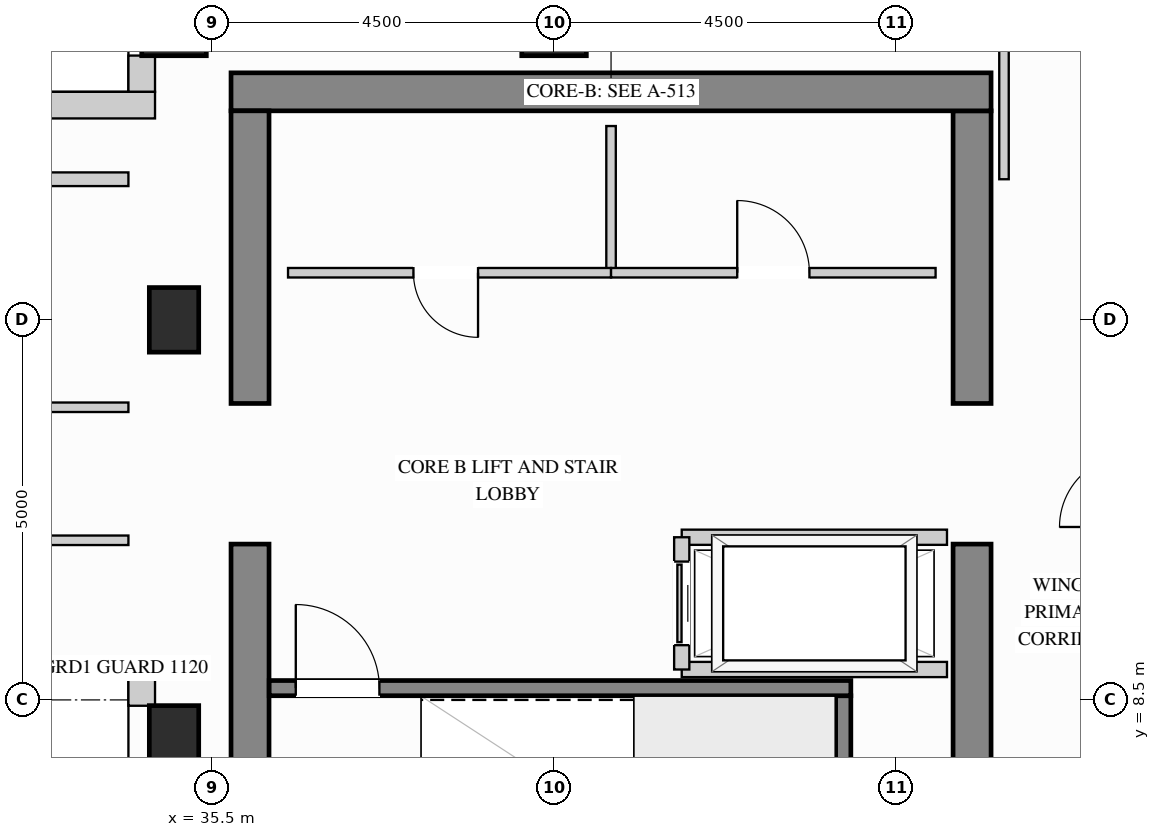
"""IFC4 building model, lengths in metres.
Left out: names, types, materials, properties, quantities, classifications, styles, units other than length and angle.
Written with IfcOpenShell. Run it as: python <this file> out.ifc"""

import sys

from ifc_helpers import new_model, si_unit, direction, frame, frame_2d, origin, origin_2d, place, context, subcontext, project, spatial, rectangle, extrude, source, transform, mapped, element, fill, save


model = new_model("IFC4")
c1 = context("Model", 3, precision=1e-05, world=origin(), true_north=direction((0.0, 1.0)))
c2 = subcontext(c1, "Body", "Model", "MODEL_VIEW")
j1 = project(units=[si_unit("LENGTHUNIT", "METRE"), si_unit("PLANEANGLEUNIT", "RADIAN")], contexts=[c1])
p1 = place(None, origin())
s1 = spatial("IfcSite", under=j1, at=p1, CompositionType="ELEMENT")
p2 = place(p1, origin())
s2 = spatial("IfcBuilding", under=s1, at=p2, CompositionType="ELEMENT")
p3 = place(p2, frame((0.0, 0.0, 248.4)))
s3 = spatial("IfcBuildingStorey", under=s2, at=p3, CompositionType="ELEMENT", Elevation=248.4)
m1 = source(origin(), c2, "Body", "SweptSolid", [
    extrude(rectangle(XDim=0.65, YDim=0.85, at=origin_2d()), origin(), (0.0, 0.0, 1.0), 3.4),
])
for number, where, z_axis, x_axis in (
    (1, (35.0, 13.5, 0.0), (0.0, 0.0, 1.0), (1.0, 0.0, 0.0)),
    (2, (35.0, 8.0, 0.0), (0.0, 0.0, 1.0), (1.0, 0.0, 0.0)),
):
    element("IfcColumn", number, at=place(p3, frame(where, z_axis=z_axis, x_axis=x_axis)), inside=s3, PredefinedType="COLUMN", context=c2, shape_type="MappedRepresentation", body=[
        mapped(m1, transform((0.0, 0.0, 0.0), x_axis=(1.0, 0.0, 0.0), y_axis=(0.0, 1.0, 0.0), z_axis=(0.0, 0.0, 1.0))),
    ])
m2 = source(origin(), c2, "Body", "SweptSolid", [
    extrude(rectangle(XDim=0.85, YDim=0.85, at=origin_2d()), origin(), (0.0, 0.0, 1.0), 3.4),
])
for number, where, z_axis, x_axis in (
    (3, (35.0, 17.4, 0.0), (0.0, 0.0, 1.0), (1.0, 0.0, 0.0)),
    (4, (40.0, 17.4, 0.0), (0.0, 0.0, 1.0), (1.0, 0.0, 0.0)),
):
    element("IfcColumn", number, at=place(p3, frame(where, z_axis=z_axis, x_axis=x_axis)), inside=s3, PredefinedType="COLUMN", context=c2, shape_type="MappedRepresentation", body=[
        mapped(m2, transform((0.0, 0.0, 0.0), x_axis=(1.0, 0.0, 0.0), y_axis=(0.0, 1.0, 0.0), z_axis=(0.0, 0.0, 1.0))),
    ])
m3 = source(origin(), c2, "Body", "SweptSolid", [
    extrude(rectangle(XDim=5.8, YDim=0.5, at=frame_2d((2.9, 0.0))), origin(), (0.0, 0.0, 1.0), 3.4),
])
p4 = place(p3, frame((45.5, 4.75, 0.0), z_axis=(0.0, 0.0, 1.0), x_axis=(0.0, 1.0, 0.0)))
e5 = element("IfcWall", 5, at=p4, inside=s3, PredefinedType="SHEAR", context=c2, shape_type="MappedRepresentation", body=[
    mapped(m3, transform((0.0, 0.0, 0.0), x_axis=(1.0, 0.0, 0.0), y_axis=(0.0, 1.0, 0.0), z_axis=(0.0, 0.0, 1.0))),
])
m4 = source(origin(), c2, "Body", "SweptSolid", [
    extrude(rectangle(XDim=3.85, YDim=0.5, at=frame_2d((1.925, 0.0))), origin(), (0.0, 0.0, 1.0), 3.4),
])
p5 = place(p3, frame((45.5, 12.4, 0.0), z_axis=(0.0, 0.0, 1.0), x_axis=(0.0, 1.0, 0.0)))
e6 = element("IfcWall", 6, at=p5, inside=s3, PredefinedType="SHEAR", context=c2, shape_type="MappedRepresentation", body=[
    mapped(m4, transform((0.0, 0.0, 0.0), x_axis=(1.0, 0.0, 0.0), y_axis=(0.0, 1.0, 0.0), z_axis=(0.0, 0.0, 1.0))),
])
m5 = source(origin(), c2, "Body", "SweptSolid", [
    extrude(rectangle(XDim=10.0, YDim=0.5, at=frame_2d((5.0, 0.0))), origin(), (0.0, 0.0, 1.0), 3.4),
])
p6 = place(p3, frame((35.75, 16.5, 0.0), z_axis=(0.0, 0.0, 1.0), x_axis=(1.0, 0.0, 0.0)))
e7 = element("IfcWall", 7, at=p6, inside=s3, PredefinedType="SHEAR", context=c2, shape_type="MappedRepresentation", body=[
    mapped(m5, transform((0.0, 0.0, 0.0), x_axis=(1.0, 0.0, 0.0), y_axis=(0.0, 1.0, 0.0), z_axis=(0.0, 0.0, 1.0))),
])
p7 = place(p3, frame((36.0, 4.75, 0.0), z_axis=(0.0, 0.0, 1.0), x_axis=(0.0, 1.0, 0.0)))
e8 = element("IfcWall", 8, at=p7, inside=s3, PredefinedType="SHEAR", context=c2, shape_type="MappedRepresentation", body=[
    mapped(m3, transform((0.0, 0.0, 0.0), x_axis=(1.0, 0.0, 0.0), y_axis=(0.0, 1.0, 0.0), z_axis=(0.0, 0.0, 1.0))),
])
p8 = place(p3, frame((36.0, 12.4, 0.0), z_axis=(0.0, 0.0, 1.0), x_axis=(0.0, 1.0, 0.0)))
e9 = element("IfcWall", 9, at=p8, inside=s3, PredefinedType="SHEAR", context=c2, shape_type="MappedRepresentation", body=[
    mapped(m4, transform((0.0, 0.0, 0.0), x_axis=(1.0, 0.0, 0.0), y_axis=(0.0, 1.0, 0.0), z_axis=(0.0, 0.0, 1.0))),
])
m6 = source(origin(), c2, "Body", "SweptSolid", [
    extrude(rectangle(XDim=0.379, YDim=0.35, at=frame_2d((0.189, 0.0))), origin(), (0.0, 0.0, 1.0), 3.385),
])
p9 = place(p3, frame((34.575, 8.802, 0.0), z_axis=(0.0, 0.0, 1.0), x_axis=(0.0, -1.0, 0.0)))
e10 = element("IfcWall", 10, at=p9, inside=s3, PredefinedType="SOLIDWALL", context=c2, shape_type="MappedRepresentation", body=[
    mapped(m6, transform((0.0, 0.0, 0.0), x_axis=(1.0, 0.0, 0.0), y_axis=(0.0, 1.0, 0.0), z_axis=(0.0, 0.0, 1.0))),
])
m7 = source(origin(), c2, "Body", "SweptSolid", [
    extrude(rectangle(XDim=0.479, YDim=0.35, at=frame_2d((0.24, 0.0))), origin(), (0.0, 0.0, 1.0), 3.385),
])
p10 = place(p3, frame((34.575, 16.977, 0.0), z_axis=(0.0, 0.0, 1.0), x_axis=(0.0, -1.0, 0.0)))
e11 = element("IfcWall", 11, at=p10, inside=s3, PredefinedType="SOLIDWALL", context=c2, shape_type="MappedRepresentation", body=[
    mapped(m7, transform((0.0, 0.0, 0.0), x_axis=(1.0, 0.0, 0.0), y_axis=(0.0, 1.0, 0.0), z_axis=(0.0, 0.0, 1.0))),
])
m8 = source(origin(), c2, "Body", "SweptSolid", [
    extrude(rectangle(XDim=3.927, YDim=0.35, at=frame_2d((1.963, 0.0))), origin(), (0.0, 0.0, 1.0), 3.385),
])
p11 = place(p3, frame((34.75, 16.325, 0.0), z_axis=(0.0, 0.0, 1.0), x_axis=(-1.0, 0.0, 0.0)))
e12 = element("IfcWall", 12, at=p11, inside=s3, PredefinedType="SOLIDWALL", context=c2, shape_type="MappedRepresentation", body=[
    mapped(m8, transform((0.0, 0.0, 0.0), x_axis=(1.0, 0.0, 0.0), y_axis=(0.0, 1.0, 0.0), z_axis=(0.0, 0.0, 1.0))),
])
m9 = source(origin(), c2, "Body", "SweptSolid", [
    extrude(rectangle(XDim=15.25, YDim=0.18, at=frame_2d((7.625, 0.0))), origin(), (0.0, 0.0, 1.0), 3.385),
])
p12 = place(p3, frame((19.15, 15.35, 0.0), z_axis=(0.0, 0.0, 1.0), x_axis=(1.0, 0.0, 0.0)))
e13 = element("IfcWall", 13, at=p12, inside=s3, PredefinedType="PARTITIONING", context=c2, shape_type="MappedRepresentation", body=[
    mapped(m9, transform((0.0, 0.0, 0.0), x_axis=(1.0, 0.0, 0.0), y_axis=(0.0, 1.0, 0.0), z_axis=(0.0, 0.0, 1.0))),
])
m10 = source(origin(), c2, "Body", "SweptSolid", [
    extrude(rectangle(XDim=1.93, YDim=0.125, at=frame_2d((0.965, 0.0))), origin(), (0.0, 0.0, 1.0), 3.385),
])
p13 = place(p3, frame((40.75, 14.12, 0.0), z_axis=(0.0, 0.0, 1.0), x_axis=(0.0, 1.0, 0.0)))
e14 = element("IfcWall", 14, at=p13, inside=s3, PredefinedType="PARTITIONING", context=c2, shape_type="MappedRepresentation", body=[
    mapped(m10, transform((0.0, 0.0, 0.0), x_axis=(1.0, 0.0, 0.0), y_axis=(0.0, 1.0, 0.0), z_axis=(0.0, 0.0, 1.0))),
])
p14 = place(p3, frame((36.5, 14.12, 0.0), z_axis=(0.0, 0.0, 1.0), x_axis=(1.0, 0.0, 0.0)))
e15 = element("IfcWall", 15, at=p14, inside=s3, PredefinedType="PARTITIONING", context=c2, shape_type="SweptSolid", body=[
    extrude(rectangle(XDim=4.25, YDim=0.125, at=frame_2d((2.125, 0.0))), origin(), (0.0, 0.0, 1.0), 3.385),
])
p15 = place(p14, frame((1.65, 0.0, 0.0)))
e16 = element("IfcOpeningElement", 16, at=p15, cuts=e15, PredefinedType="OPENING", context=c2, shape_type="SweptSolid", body=[
    extrude(rectangle(XDim=0.85, YDim=2.1, at=frame_2d((0.425, 1.05))), frame((0.0, 0.073, 0.0), z_axis=(0.0, -1.0, 0.0), x_axis=(1.0, 0.0, 0.0)), (0.0, 0.0, 1.0), 0.145),
])
p16 = place(p3, frame((40.75, 14.12, 0.0), z_axis=(0.0, 0.0, 1.0), x_axis=(1.0, 0.0, 0.0)))
e17 = element("IfcWall", 17, at=p16, inside=s3, PredefinedType="PARTITIONING", context=c2, shape_type="SweptSolid", body=[
    extrude(rectangle(XDim=4.27, YDim=0.125, at=frame_2d((2.135, 0.0))), origin(), (0.0, 0.0, 1.0), 3.385),
])
p17 = place(p16, frame((1.66, 0.0, 0.0)))
e18 = element("IfcOpeningElement", 18, at=p17, cuts=e17, PredefinedType="OPENING", context=c2, shape_type="SweptSolid", body=[
    extrude(rectangle(XDim=0.95, YDim=2.15, at=frame_2d((0.475, 1.075))), frame((0.0, 0.073, 0.0), z_axis=(0.0, -1.0, 0.0), x_axis=(1.0, 0.0, 0.0)), (0.0, 0.0, 1.0), 0.145),
])
m11 = source(origin(), c2, "Body", "SweptSolid", [
    extrude(rectangle(XDim=2.298, YDim=0.125, at=frame_2d((1.149, 0.0))), origin(), (0.0, 0.0, 1.0), 3.385),
])
p18 = place(p3, frame((45.92, 15.35, 0.0), z_axis=(0.0, 0.0, 1.0), x_axis=(0.0, 1.0, 0.0)))
e19 = element("IfcWall", 19, at=p18, inside=s3, PredefinedType="PARTITIONING", context=c2, shape_type="MappedRepresentation", body=[
    mapped(m11, transform((0.0, 0.0, 0.0), x_axis=(1.0, 0.0, 0.0), y_axis=(0.0, 1.0, 0.0), z_axis=(0.0, 0.0, 1.0))),
])
p19 = place(p3, frame((29.85, 12.35, 0.0), z_axis=(0.0, 0.0, 1.0), x_axis=(1.0, 0.0, 0.0)))
e20 = element("IfcWall", 20, at=p19, inside=s3, PredefinedType="PARTITIONING", context=c2, shape_type="SweptSolid", body=[
    extrude(rectangle(XDim=4.55, YDim=0.125, at=frame_2d((2.275, 0.0))), origin(), (0.0, 0.0, 1.0), 3.385),
])
p20 = place(p19, frame((1.8, 0.0, 0.0)))
e21 = element("IfcOpeningElement", 21, at=p20, cuts=e20, PredefinedType="OPENING", context=c2, shape_type="SweptSolid", body=[
    extrude(rectangle(XDim=0.95, YDim=2.15, at=frame_2d((0.475, 1.075))), frame((0.0, 0.073, 0.0), z_axis=(0.0, -1.0, 0.0), x_axis=(1.0, 0.0, 0.0)), (0.0, 0.0, 1.0), 0.145),
])
p21 = place(p3, frame((26.95, 10.6, 0.0), z_axis=(0.0, 0.0, 1.0), x_axis=(1.0, 0.0, 0.0)))
e22 = element("IfcWall", 22, at=p21, inside=s3, PredefinedType="PARTITIONING", context=c2, shape_type="SweptSolid", body=[
    extrude(rectangle(XDim=7.45, YDim=0.125, at=frame_2d((3.725, 0.0))), origin(), (0.0, 0.0, 1.0), 3.385),
])
p22 = place(p21, frame((4.478, 0.0, 0.0)))
e23 = element("IfcOpeningElement", 23, at=p22, cuts=e22, PredefinedType="OPENING", context=c2, shape_type="SweptSolid", body=[
    extrude(rectangle(XDim=0.95, YDim=2.15, at=frame_2d((0.475, 1.075))), frame((0.0, 0.073, 0.0), z_axis=(0.0, -1.0, 0.0), x_axis=(1.0, 0.0, 0.0)), (0.0, 0.0, 1.0), 0.145),
])
m12 = source(origin(), c2, "Body", "SweptSolid", [
    extrude(rectangle(XDim=3.49, YDim=0.2, at=frame_2d((1.745, 0.0))), origin(), (0.0, 0.0, 1.0), 3.385),
])
for number, where, z_axis, x_axis in (
    (24, (41.68, 10.64, 0.0), (0.0, 0.0, 1.0), (1.0, 0.0, 0.0)),
    (25, (41.68, 8.9, 0.0), (0.0, 0.0, 1.0), (1.0, 0.0, 0.0)),
):
    element("IfcWall", number, at=place(p3, frame(where, z_axis=z_axis, x_axis=x_axis)), inside=s3, PredefinedType="PARTITIONING", context=c2, shape_type="MappedRepresentation", body=[
        mapped(m12, transform((0.0, 0.0, 0.0), x_axis=(1.0, 0.0, 0.0), y_axis=(0.0, 1.0, 0.0), z_axis=(0.0, 0.0, 1.0))),
    ])
p23 = place(p3, frame((41.68, 8.9, 0.0), z_axis=(0.0, 0.0, 1.0), x_axis=(0.0, 1.0, 0.0)))
e26 = element("IfcWall", 26, at=p23, inside=s3, PredefinedType="PARTITIONING", context=c2, shape_type="SweptSolid", body=[
    extrude(rectangle(XDim=1.74, YDim=0.2, at=frame_2d((0.87, 0.0))), origin(), (0.0, 0.0, 1.0), 3.385),
])
p24 = place(p23, frame((0.32, 0.0, 0.0)))
e27 = element("IfcOpeningElement", 27, at=p24, cuts=e26, PredefinedType="OPENING", context=c2, shape_type="SweptSolid", body=[
    extrude(rectangle(XDim=1.1, YDim=2.2, at=frame_2d((0.55, 1.1))), frame((0.0, 0.11, 0.0), z_axis=(0.0, -1.0, 0.0), x_axis=(1.0, 0.0, 0.0)), (0.0, 0.0, 1.0), 0.22),
])
m13 = source(origin(), c2, "Body", "SweptSolid", [
    extrude(rectangle(XDim=3.803, YDim=0.2, at=frame_2d((1.901, 0.0))), origin(), (0.0, 0.0, 1.0), 3.4),
])
p25 = place(p3, frame((43.805, 4.752, 0.0), z_axis=(0.0, 0.0, 1.0), x_axis=(0.0, 1.0, 0.0)))
e28 = element("IfcWall", 28, at=p25, inside=s3, PredefinedType="SHEAR", context=c2, shape_type="MappedRepresentation", body=[
    mapped(m13, transform((0.0, 0.0, 0.0), x_axis=(1.0, 0.0, 0.0), y_axis=(0.0, 1.0, 0.0), z_axis=(0.0, 0.0, 1.0))),
])
p26 = place(p3, frame((36.252, 8.655, 0.0), z_axis=(0.0, 0.0, 1.0), x_axis=(1.0, 0.0, 0.0)))
e29 = element("IfcWall", 29, at=p26, inside=s3, PredefinedType="SHEAR", context=c2, shape_type="SweptSolid", body=[
    extrude(rectangle(XDim=7.653, YDim=0.2, at=frame_2d((3.827, 0.0))), origin(), (0.0, 0.0, 1.0), 3.4),
])
p27 = place(p26, frame((0.35, 0.0, 0.0)))
e30 = element("IfcOpeningElement", 30, at=p27, cuts=e29, PredefinedType="OPENING", context=c2, shape_type="SweptSolid", body=[
    extrude(rectangle(XDim=1.1, YDim=2.15, at=frame_2d((0.55, 1.075))), frame((0.0, 0.11, 0.0), z_axis=(0.0, -1.0, 0.0), x_axis=(1.0, 0.0, 0.0)), (0.0, 0.0, 1.0), 0.22),
])
m14 = source(origin(), c2, "Body", "SweptSolid", [
    extrude(rectangle(XDim=1.1, YDim=2.2, at=frame_2d((0.55, 1.1))), frame((0.0, 0.025, 0.0), z_axis=(0.0, -1.0, 0.0), x_axis=(1.0, 0.0, 0.0)), (0.0, 0.0, 1.0), 0.05),
])
p28 = place(p24, origin())
e31 = element("IfcDoor", 31, at=p28, inside=s3, OperationType="SLIDING_TO_LEFT", PredefinedType="DOOR", context=c2, shape_type="MappedRepresentation", body=[
    mapped(m14, transform((0.0, 0.0, 0.0), x_axis=(1.0, 0.0, 0.0), y_axis=(0.0, 1.0, 0.0), z_axis=(0.0, 0.0, 1.0))),
])
fill(e27, e31)
m15 = source(origin(), c2, "Body", "SweptSolid", [
    extrude(rectangle(XDim=0.95, YDim=2.15, at=frame_2d((0.475, 1.075))), frame((0.0, 0.025, 0.0), z_axis=(0.0, -1.0, 0.0), x_axis=(1.0, 0.0, 0.0)), (0.0, 0.0, 1.0), 0.05),
])
p29 = place(p17, origin())
e32 = element("IfcDoor", 32, at=p29, inside=s3, OperationType="SINGLE_SWING_LEFT", PredefinedType="DOOR", context=c2, shape_type="MappedRepresentation", body=[
    mapped(m15, transform((0.0, 0.0, 0.0), x_axis=(1.0, 0.0, 0.0), y_axis=(0.0, 1.0, 0.0), z_axis=(0.0, 0.0, 1.0))),
])
fill(e18, e32)
m16 = source(origin(), c2, "Body", "SweptSolid", [
    extrude(rectangle(XDim=0.85, YDim=2.1, at=frame_2d((0.425, 1.05))), frame((0.0, 0.025, 0.0), z_axis=(0.0, -1.0, 0.0), x_axis=(1.0, 0.0, 0.0)), (0.0, 0.0, 1.0), 0.05),
])
p30 = place(p15, origin())
e33 = element("IfcDoor", 33, at=p30, inside=s3, OperationType="SINGLE_SWING_RIGHT", PredefinedType="DOOR", context=c2, shape_type="MappedRepresentation", body=[
    mapped(m16, transform((0.0, 0.0, 0.0), x_axis=(1.0, 0.0, 0.0), y_axis=(0.0, 1.0, 0.0), z_axis=(0.0, 0.0, 1.0))),
])
fill(e16, e33)
m17 = source(origin(), c2, "Body", "SweptSolid", [
    extrude(rectangle(XDim=1.1, YDim=2.15, at=frame_2d((0.55, 1.075))), frame((0.0, 0.025, 0.0), z_axis=(0.0, -1.0, 0.0), x_axis=(1.0, 0.0, 0.0)), (0.0, 0.0, 1.0), 0.05),
])
p31 = place(p27, origin())
e34 = element("IfcDoor", 34, at=p31, inside=s3, OperationType="SINGLE_SWING_LEFT", PredefinedType="DOOR", context=c2, shape_type="MappedRepresentation", body=[
    mapped(m17, transform((0.0, 0.0, 0.0), x_axis=(1.0, 0.0, 0.0), y_axis=(0.0, 1.0, 0.0), z_axis=(0.0, 0.0, 1.0))),
])
fill(e30, e34)
save(model, sys.argv[1])
